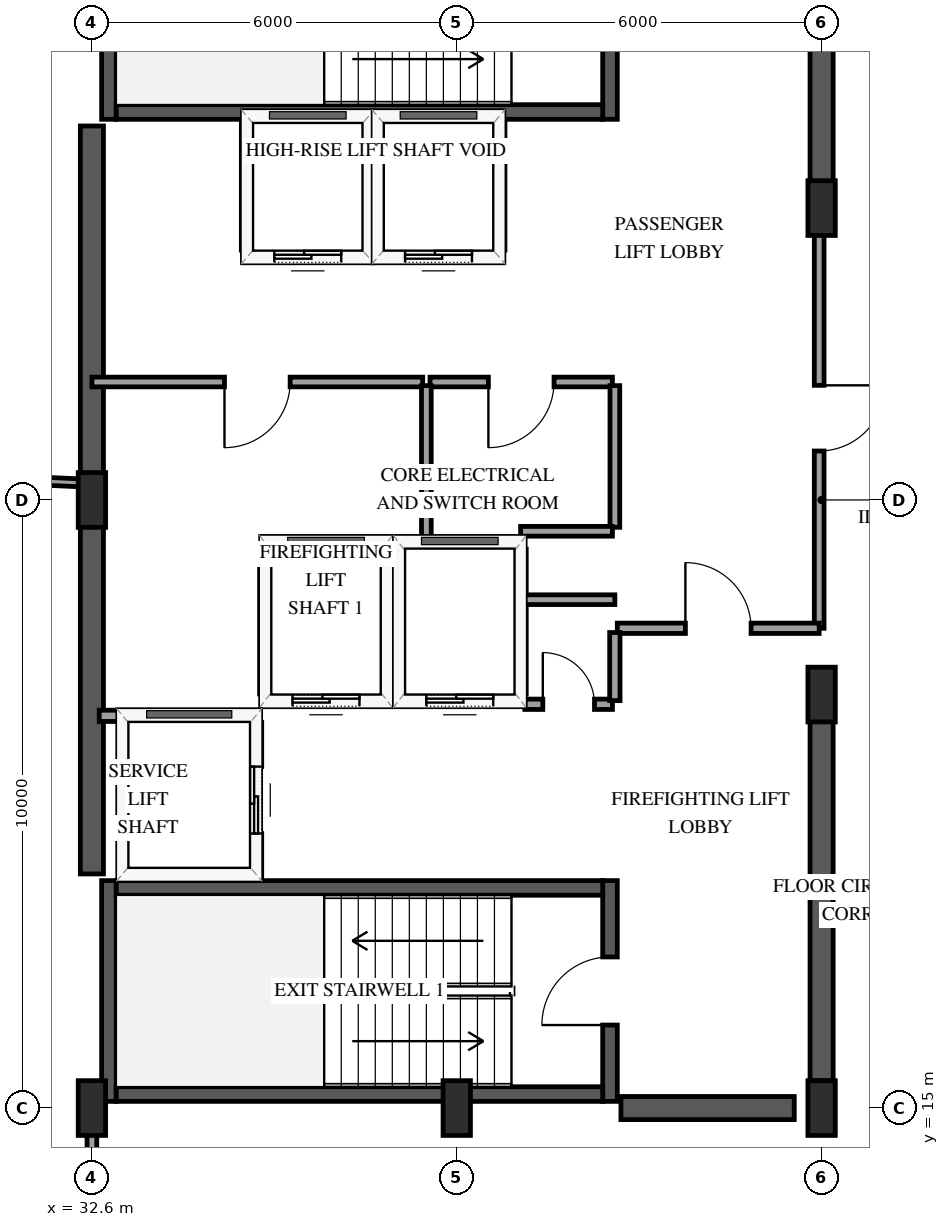
"""IFC4 building model, lengths in metres.
Left out: names, types, materials, properties, quantities, classifications, styles, units other than length and angle.
Written with IfcOpenShell. Run it as: python <this file> out.ifc"""

import sys

from ifc_helpers import new_model, si_unit, direction, frame, frame_2d, origin, origin_2d, place, context, subcontext, project, spatial, rectangle, extrude, element, fill, save


model = new_model("IFC4")
c1 = context("Model", 3, precision=1e-05, world=origin(), true_north=direction((0.0, 1.0)))
c2 = subcontext(c1, "Body", "Model", "MODEL_VIEW")
j1 = project(units=[si_unit("LENGTHUNIT", "METRE"), si_unit("PLANEANGLEUNIT", "RADIAN")], contexts=[c1])
p1 = place(None, origin())
s1 = spatial("IfcSite", under=j1, at=p1, CompositionType="ELEMENT")
p2 = place(p1, origin())
s2 = spatial("IfcBuilding", under=s1, at=p2, CompositionType="ELEMENT")
p3 = place(p2, frame((0.0, 0.0, 301.45)))
s3 = spatial("IfcBuildingStorey", under=s2, at=p3, CompositionType="ELEMENT", Elevation=301.45)
p4 = place(p3, frame((32.88, 15.11, 0.0), z_axis=(0.0, 0.0, 1.0), x_axis=(0.0, 1.0, 0.0)))
e1 = element("IfcWall", 1, at=p4, inside=s3, PredefinedType="SHEAR", context=c2, shape_type="SweptSolid", body=[
    extrude(rectangle(XDim=3.63, YDim=0.24, at=frame_2d((1.815, 0.0))), origin(), (0.0, 0.0, 1.0), 4.2),
])
p5 = place(p3, frame((41.12, 15.11, 0.0), z_axis=(0.0, 0.0, 1.0), x_axis=(0.0, 1.0, 0.0)))
e2 = element("IfcWall", 2, at=p5, inside=s3, PredefinedType="SHEAR", context=c2, shape_type="SweptSolid", body=[
    extrude(rectangle(XDim=3.63, YDim=0.24, at=frame_2d((1.815, 0.0))), origin(), (0.0, 0.0, 1.0), 4.2),
])
p6 = place(p5, frame((1.255, 0.0, 0.0)))
e3 = element("IfcOpeningElement", 3, at=p6, cuts=e2, PredefinedType="OPENING", context=c2, shape_type="SweptSolid", body=[
    extrude(rectangle(XDim=1.12, YDim=2.15, at=frame_2d((0.56, 1.075))), frame((0.0, 0.13, 0.0), z_axis=(0.0, -1.0, 0.0), x_axis=(1.0, 0.0, 0.0)), (0.0, 0.0, 1.0), 0.26),
])
for number, where, z_axis, x_axis in (
    (4, (33.0, 15.23, 0.0), (0.0, 0.0, 1.0), (1.0, 0.0, 0.0)),
    (5, (33.0, 18.62, 0.0), (0.0, 0.0, 1.0), (1.0, 0.0, 0.0)),
):
    element("IfcWall", number, at=place(p3, frame(where, z_axis=z_axis, x_axis=x_axis)), inside=s3, PredefinedType="SHEAR", context=c2, shape_type="SweptSolid", body=[
        extrude(rectangle(XDim=8.0, YDim=0.24, at=frame_2d((4.0, 0.0))), origin(), (0.0, 0.0, 1.0), 4.2),
    ])
p7 = place(p3, frame((32.88, 31.26, 0.0), z_axis=(0.0, 0.0, 1.0), x_axis=(0.0, 1.0, 0.0)))
e6 = element("IfcWall", 6, at=p7, inside=s3, PredefinedType="SHEAR", context=c2, shape_type="SweptSolid", body=[
    extrude(rectangle(XDim=3.63, YDim=0.24, at=frame_2d((1.815, 0.0))), origin(), (0.0, 0.0, 1.0), 4.2),
])
p8 = place(p3, frame((41.12, 31.26, 0.0), z_axis=(0.0, 0.0, 1.0), x_axis=(0.0, 1.0, 0.0)))
e7 = element("IfcWall", 7, at=p8, inside=s3, PredefinedType="SHEAR", context=c2, shape_type="SweptSolid", body=[
    extrude(rectangle(XDim=3.63, YDim=0.24, at=frame_2d((1.815, 0.0))), origin(), (0.0, 0.0, 1.0), 4.2),
])
p9 = place(p8, frame((1.255, 0.0, 0.0)))
e8 = element("IfcOpeningElement", 8, at=p9, cuts=e7, PredefinedType="OPENING", context=c2, shape_type="SweptSolid", body=[
    extrude(rectangle(XDim=1.12, YDim=2.15, at=frame_2d((0.56, 1.075))), frame((0.0, 0.13, 0.0), z_axis=(0.0, -1.0, 0.0), x_axis=(1.0, 0.0, 0.0)), (0.0, 0.0, 1.0), 0.26),
])
p10 = place(p3, frame((33.0, 31.38, 0.0), z_axis=(0.0, 0.0, 1.0), x_axis=(1.0, 0.0, 0.0)))
e9 = element("IfcWall", 9, at=p10, inside=s3, PredefinedType="SHEAR", context=c2, shape_type="SweptSolid", body=[
    extrude(rectangle(XDim=8.0, YDim=0.24, at=frame_2d((4.0, 0.0))), origin(), (0.0, 0.0, 1.0), 4.2),
])
p11 = place(p3, frame((32.6, 18.85, 0.0), z_axis=(0.0, 0.0, 1.0), x_axis=(0.0, 1.0, 0.0)))
e10 = element("IfcWall", 10, at=p11, inside=s3, PredefinedType="SHEAR", context=c2, shape_type="SweptSolid", body=[
    extrude(rectangle(XDim=12.3, YDim=0.38, at=frame_2d((6.15, 0.0))), origin(), (0.0, 0.0, 1.0), 4.2),
])
p12 = place(p3, frame((41.3, 15.0, 0.0), z_axis=(0.0, 0.0, 1.0), x_axis=(1.0, 0.0, 0.0)))
e11 = element("IfcWall", 11, at=p12, inside=s3, PredefinedType="SHEAR", context=c2, shape_type="SweptSolid", body=[
    extrude(rectangle(XDim=2.85, YDim=0.38, at=frame_2d((1.425, 0.0))), origin(), (0.0, 0.0, 1.0), 4.2),
])
p13 = place(p3, frame((44.6, 15.45, 0.0), z_axis=(0.0, 0.0, 1.0), x_axis=(0.0, 1.0, 0.0)))
e12 = element("IfcWall", 12, at=p13, inside=s3, PredefinedType="SHEAR", context=c2, shape_type="SweptSolid", body=[
    extrude(rectangle(XDim=6.35, YDim=0.38, at=frame_2d((3.175, 0.0))), origin(), (0.0, 0.0, 1.0), 4.2),
])
p14 = place(p3, frame((44.6, 29.8, 0.0), z_axis=(0.0, 0.0, 1.0), x_axis=(0.0, 1.0, 0.0)))
e13 = element("IfcWall", 13, at=p14, inside=s3, PredefinedType="SHEAR", context=c2, shape_type="SweptSolid", body=[
    extrude(rectangle(XDim=4.75, YDim=0.38, at=frame_2d((2.375, 0.0))), origin(), (0.0, 0.0, 1.0), 4.2),
])
for number, where, z_axis, x_axis in (
    (14, (32.6, 15.0, 0.0), (0.0, 0.0, 1.0), (1.0, 0.0, 0.0)),
    (15, (32.6, 25.0, 0.0), (0.0, 0.0, 1.0), (1.0, 0.0, 0.0)),
    (16, (38.6, 15.0, 0.0), (0.0, 0.0, 1.0), (1.0, 0.0, 0.0)),
    (17, (44.6, 15.0, 0.0), (0.0, 0.0, 1.0), (1.0, 0.0, 0.0)),
    (18, (44.6, 21.8, 0.0), (0.0, 0.0, 1.0), (1.0, 0.0, 0.0)),
    (19, (44.6, 29.8, 0.0), (0.0, 0.0, 1.0), (1.0, 0.0, 0.0)),
):
    element("IfcColumn", number, at=place(p3, frame(where, z_axis=z_axis, x_axis=x_axis)), inside=s3, PredefinedType="PILASTER", context=c2, shape_type="SweptSolid", body=[
        extrude(rectangle(XDim=0.45, YDim=0.9, at=origin_2d()), origin(), (0.0, 0.0, 1.0), 4.2),
    ])
p15 = place(p3, frame((35.45, 21.7, 0.0), z_axis=(0.0, 0.0, 1.0), x_axis=(1.0, 0.0, 0.0)))
e20 = element("IfcWall", 20, at=p15, inside=s3, PredefinedType="SOLIDWALL", context=c2, shape_type="SweptSolid", body=[
    extrude(rectangle(XDim=2.0, YDim=0.185, at=frame_2d((1.0, 0.0))), origin(), (0.0, 0.0, 1.0), 3.895),
])
p16 = place(p15, frame((0.45, 0.0, 0.0)))
e21 = element("IfcOpeningElement", 21, at=p16, cuts=e20, PredefinedType="OPENING", context=c2, shape_type="SweptSolid", body=[
    extrude(rectangle(XDim=1.1, YDim=2.15, at=frame_2d((0.55, 1.075))), frame((0.0, 0.103, 0.0), z_axis=(0.0, -1.0, 0.0), x_axis=(1.0, 0.0, 0.0)), (0.0, 0.0, 1.0), 0.205),
])
p17 = place(p3, frame((35.45, 24.3, 0.0), z_axis=(0.0, 0.0, 1.0), x_axis=(1.0, 0.0, 0.0)))
e22 = element("IfcWall", 22, at=p17, inside=s3, PredefinedType="SOLIDWALL", context=c2, shape_type="SweptSolid", body=[
    extrude(rectangle(XDim=2.0, YDim=0.185, at=frame_2d((1.0, 0.0))), origin(), (0.0, 0.0, 1.0), 3.895),
])
for number, where, z_axis, x_axis in (
    (23, (35.45, 21.81, 0.0), (0.0, 0.0, 1.0), (0.0, 1.0, 0.0)),
    (24, (37.45, 21.81, 0.0), (0.0, 0.0, 1.0), (0.0, 1.0, 0.0)),
):
    element("IfcWall", number, at=place(p3, frame(where, z_axis=z_axis, x_axis=x_axis)), inside=s3, PredefinedType="SOLIDWALL", context=c2, shape_type="SweptSolid", body=[
        extrude(rectangle(XDim=2.38, YDim=0.185, at=frame_2d((1.19, 0.0))), origin(), (0.0, 0.0, 1.0), 3.895),
    ])
p18 = place(p3, frame((37.65, 21.7, 0.0), z_axis=(0.0, 0.0, 1.0), x_axis=(1.0, 0.0, 0.0)))
e25 = element("IfcWall", 25, at=p18, inside=s3, PredefinedType="SOLIDWALL", context=c2, shape_type="SweptSolid", body=[
    extrude(rectangle(XDim=2.0, YDim=0.185, at=frame_2d((1.0, 0.0))), origin(), (0.0, 0.0, 1.0), 3.895),
])
p19 = place(p18, frame((0.45, 0.0, 0.0)))
e26 = element("IfcOpeningElement", 26, at=p19, cuts=e25, PredefinedType="OPENING", context=c2, shape_type="SweptSolid", body=[
    extrude(rectangle(XDim=1.1, YDim=2.15, at=frame_2d((0.55, 1.075))), frame((0.0, 0.103, 0.0), z_axis=(0.0, -1.0, 0.0), x_axis=(1.0, 0.0, 0.0)), (0.0, 0.0, 1.0), 0.205),
])
p20 = place(p3, frame((37.65, 24.3, 0.0), z_axis=(0.0, 0.0, 1.0), x_axis=(1.0, 0.0, 0.0)))
e27 = element("IfcWall", 27, at=p20, inside=s3, PredefinedType="SOLIDWALL", context=c2, shape_type="SweptSolid", body=[
    extrude(rectangle(XDim=2.0, YDim=0.185, at=frame_2d((1.0, 0.0))), origin(), (0.0, 0.0, 1.0), 3.895),
])
p21 = place(p3, frame((39.65, 21.81, 0.0), z_axis=(0.0, 0.0, 1.0), x_axis=(0.0, 1.0, 0.0)))
e28 = element("IfcWall", 28, at=p21, inside=s3, PredefinedType="SOLIDWALL", context=c2, shape_type="SweptSolid", body=[
    extrude(rectangle(XDim=2.38, YDim=0.185, at=frame_2d((1.19, 0.0))), origin(), (0.0, 0.0, 1.0), 3.895),
])
p22 = place(p3, frame((32.72, 21.45, 0.0), z_axis=(0.0, 0.0, 1.0), x_axis=(1.0, 0.0, 0.0)))
e29 = element("IfcWall", 29, at=p22, inside=s3, PredefinedType="SOLIDWALL", context=c2, shape_type="SweptSolid", body=[
    extrude(rectangle(XDim=2.58, YDim=0.185, at=frame_2d((1.29, 0.0))), origin(), (0.0, 0.0, 1.0), 3.895),
])
p23 = place(p3, frame((35.3, 18.79, 0.0), z_axis=(0.0, 0.0, 1.0), x_axis=(0.0, 1.0, 0.0)))
e30 = element("IfcWall", 30, at=p23, inside=s3, PredefinedType="SOLIDWALL", context=c2, shape_type="SweptSolid", body=[
    extrude(rectangle(XDim=2.55, YDim=0.185, at=frame_2d((1.275, 0.0))), origin(), (0.0, 0.0, 1.0), 3.895),
])
p24 = place(p23, frame((0.725, 0.0, 0.0)))
e31 = element("IfcOpeningElement", 31, at=p24, cuts=e30, PredefinedType="OPENING", context=c2, shape_type="SweptSolid", body=[
    extrude(rectangle(XDim=1.1, YDim=2.15, at=frame_2d((0.55, 1.075))), frame((0.0, 0.103, 0.0), z_axis=(0.0, -1.0, 0.0), x_axis=(1.0, 0.0, 0.0)), (0.0, 0.0, 1.0), 0.205),
])
p25 = place(p3, frame((35.15, 29.0, 0.0), z_axis=(0.0, 0.0, 1.0), x_axis=(1.0, 0.0, 0.0)))
e32 = element("IfcWall", 32, at=p25, inside=s3, PredefinedType="SOLIDWALL", context=c2, shape_type="SweptSolid", body=[
    extrude(rectangle(XDim=2.0, YDim=0.185, at=frame_2d((1.0, 0.0))), origin(), (0.0, 0.0, 1.0), 3.895),
])
p26 = place(p25, frame((0.45, 0.0, 0.0)))
e33 = element("IfcOpeningElement", 33, at=p26, cuts=e32, PredefinedType="OPENING", context=c2, shape_type="SweptSolid", body=[
    extrude(rectangle(XDim=1.1, YDim=2.15, at=frame_2d((0.55, 1.075))), frame((0.0, 0.103, 0.0), z_axis=(0.0, -1.0, 0.0), x_axis=(1.0, 0.0, 0.0)), (0.0, 0.0, 1.0), 0.205),
])
for number, where, z_axis, x_axis in (
    (34, (35.15, 29.11, 0.0), (0.0, 0.0, 1.0), (0.0, 1.0, 0.0)),
    (35, (37.15, 29.11, 0.0), (0.0, 0.0, 1.0), (0.0, 1.0, 0.0)),
):
    element("IfcWall", number, at=place(p3, frame(where, z_axis=z_axis, x_axis=x_axis)), inside=s3, PredefinedType="SOLIDWALL", context=c2, shape_type="SweptSolid", body=[
        extrude(rectangle(XDim=2.1, YDim=0.185, at=frame_2d((1.05, 0.0))), origin(), (0.0, 0.0, 1.0), 3.895),
    ])
p27 = place(p3, frame((37.3, 29.0, 0.0), z_axis=(0.0, 0.0, 1.0), x_axis=(1.0, 0.0, 0.0)))
e36 = element("IfcWall", 36, at=p27, inside=s3, PredefinedType="SOLIDWALL", context=c2, shape_type="SweptSolid", body=[
    extrude(rectangle(XDim=2.0, YDim=0.185, at=frame_2d((1.0, 0.0))), origin(), (0.0, 0.0, 1.0), 3.895),
])
p28 = place(p27, frame((0.45, 0.0, 0.0)))
e37 = element("IfcOpeningElement", 37, at=p28, cuts=e36, PredefinedType="OPENING", context=c2, shape_type="SweptSolid", body=[
    extrude(rectangle(XDim=1.1, YDim=2.15, at=frame_2d((0.55, 1.075))), frame((0.0, 0.103, 0.0), z_axis=(0.0, -1.0, 0.0), x_axis=(1.0, 0.0, 0.0)), (0.0, 0.0, 1.0), 0.205),
])
p29 = place(p3, frame((39.3, 29.11, 0.0), z_axis=(0.0, 0.0, 1.0), x_axis=(0.0, 1.0, 0.0)))
e38 = element("IfcWall", 38, at=p29, inside=s3, PredefinedType="SOLIDWALL", context=c2, shape_type="SweptSolid", body=[
    extrude(rectangle(XDim=2.1, YDim=0.185, at=frame_2d((1.05, 0.0))), origin(), (0.0, 0.0, 1.0), 3.895),
])
p30 = place(p3, frame((44.56, 29.8, 0.0), z_axis=(0.0, 0.0, 1.0), x_axis=(0.0, -1.0, 0.0)))
e39 = element("IfcWall", 39, at=p30, inside=s3, PredefinedType="PARTITIONING", context=c2, shape_type="SweptSolid", body=[
    extrude(rectangle(XDim=6.91, YDim=0.16, at=frame_2d((3.455, 0.0))), origin(), (0.0, 0.0, 1.0), 2.935),
])
p31 = place(p30, frame((2.915, 0.0, 0.0)))
e40 = element("IfcOpeningElement", 40, at=p31, cuts=e39, PredefinedType="OPENING", context=c2, shape_type="SweptSolid", body=[
    extrude(rectangle(XDim=1.08, YDim=2.15, at=frame_2d((0.54, 1.075))), frame((0.0, 0.09, 0.0), z_axis=(0.0, -1.0, 0.0), x_axis=(1.0, 0.0, 0.0)), (0.0, 0.0, 1.0), 0.18),
])
p32 = place(p3, frame((32.527, 25.276, 0.0), z_axis=(0.0, 0.0, 1.0), x_axis=(-0.99896311896, 0.045526771868, 0.0)))
e41 = element("IfcWall", 41, at=p32, inside=s3, PredefinedType="PARTITIONING", context=c2, shape_type="SweptSolid", body=[
    extrude(rectangle(XDim=6.88, YDim=0.13, at=frame_2d((3.44, 0.0))), origin(), (0.0, 0.0, 1.0), 3.19),
])
p33 = place(p3, frame((38.04, 26.94, 0.0), z_axis=(0.0, 0.0, 1.0), x_axis=(-1.0, 0.0, 0.0)))
e42 = element("IfcWall", 42, at=p33, inside=s3, PredefinedType="PARTITIONING", context=c2, shape_type="SweptSolid", body=[
    extrude(rectangle(XDim=5.44, YDim=0.16, at=frame_2d((2.72, 0.0))), origin(), (0.0, 0.0, 1.0), 3.895),
])
p34 = place(p33, frame((2.18, 0.0, 0.0)))
e43 = element("IfcOpeningElement", 43, at=p34, cuts=e42, PredefinedType="OPENING", context=c2, shape_type="SweptSolid", body=[
    extrude(rectangle(XDim=1.08, YDim=2.15, at=frame_2d((0.54, 1.075))), frame((0.0, 0.09, 0.0), z_axis=(0.0, -1.0, 0.0), x_axis=(1.0, 0.0, 0.0)), (0.0, 0.0, 1.0), 0.18),
])
p35 = place(p3, frame((41.24, 22.89, 0.0), z_axis=(0.0, 0.0, 1.0), x_axis=(1.0, 0.0, 0.0)))
e44 = element("IfcWall", 44, at=p35, inside=s3, PredefinedType="PARTITIONING", context=c2, shape_type="SweptSolid", body=[
    extrude(rectangle(XDim=3.32, YDim=0.17, at=frame_2d((1.66, 0.0))), origin(), (0.0, 0.0, 1.0), 3.895),
])
p36 = place(p35, frame((1.12, 0.0, 0.0)))
e45 = element("IfcOpeningElement", 45, at=p36, cuts=e44, PredefinedType="OPENING", context=c2, shape_type="SweptSolid", body=[
    extrude(rectangle(XDim=1.08, YDim=2.15, at=frame_2d((0.54, 1.075))), frame((0.0, 0.095, 0.0), z_axis=(0.0, -1.0, 0.0), x_axis=(1.0, 0.0, 0.0)), (0.0, 0.0, 1.0), 0.19),
])
p37 = place(p3, frame((41.16, 26.94, 0.0), z_axis=(0.0, 0.0, 1.0), x_axis=(-1.0, 0.0, 0.0)))
e46 = element("IfcWall", 46, at=p37, inside=s3, PredefinedType="PARTITIONING", context=c2, shape_type="SweptSolid", body=[
    extrude(rectangle(XDim=3.0, YDim=0.16, at=frame_2d((1.5, 0.0))), origin(), (0.0, 0.0, 1.0), 3.895),
])
p38 = place(p37, frame((0.96, 0.0, 0.0)))
e47 = element("IfcOpeningElement", 47, at=p38, cuts=e46, PredefinedType="OPENING", context=c2, shape_type="SweptSolid", body=[
    extrude(rectangle(XDim=1.08, YDim=2.15, at=frame_2d((0.54, 1.075))), frame((0.0, 0.09, 0.0), z_axis=(0.0, -1.0, 0.0), x_axis=(1.0, 0.0, 0.0)), (0.0, 0.0, 1.0), 0.18),
])
p39 = place(p3, frame((32.6, 12.242, 0.0), z_axis=(0.0, 0.0, 1.0), x_axis=(0.0, 1.0, 0.0)))
e48 = element("IfcWall", 48, at=p39, inside=s3, PredefinedType="PARTITIONING", context=c2, shape_type="SweptSolid", body=[
    extrude(rectangle(XDim=2.638, YDim=0.16, at=frame_2d((1.319, 0.0))), origin(), (0.0, 0.0, 1.0), 3.895),
])
p40 = place(p3, frame((38.1, 26.88, 0.0), z_axis=(0.0, 0.0, 1.0), x_axis=(0.0, -1.0, 0.0)))
e49 = element("IfcWall", 49, at=p40, inside=s3, PredefinedType="PARTITIONING", context=c2, shape_type="SweptSolid", body=[
    extrude(rectangle(XDim=2.58, YDim=0.16, at=frame_2d((1.29, 0.0))), origin(), (0.0, 0.0, 1.0), 3.895),
])
p41 = place(p3, frame((41.2, 24.55, 0.0), z_axis=(0.0, 0.0, 1.0), x_axis=(0.0, 1.0, 0.0)))
e50 = element("IfcWall", 50, at=p41, inside=s3, PredefinedType="PARTITIONING", context=c2, shape_type="SweptSolid", body=[
    extrude(rectangle(XDim=2.33, YDim=0.16, at=frame_2d((1.165, 0.0))), origin(), (0.0, 0.0, 1.0), 3.895),
])
p42 = place(p3, frame((39.65, 24.485, 0.0), z_axis=(0.0, 0.0, 1.0), x_axis=(1.0, 0.0, 0.0)))
e51 = element("IfcWall", 51, at=p42, inside=s3, PredefinedType="PARTITIONING", context=c2, shape_type="SweptSolid", body=[
    extrude(rectangle(XDim=1.51, YDim=0.16, at=frame_2d((0.755, 0.0))), origin(), (0.0, 0.0, 1.0), 3.895),
])
p43 = place(p3, frame((39.72, 21.64, 0.0), z_axis=(0.0, 0.0, 1.0), x_axis=(1.0, 0.0, 0.0)))
e52 = element("IfcWall", 52, at=p43, inside=s3, PredefinedType="PARTITIONING", context=c2, shape_type="SweptSolid", body=[
    extrude(rectangle(XDim=1.44, YDim=0.17, at=frame_2d((0.72, 0.0))), origin(), (0.0, 0.0, 1.0), 3.895),
])
p44 = place(p43, frame((0.295, 0.0, 0.0)))
e53 = element("IfcOpeningElement", 53, at=p44, cuts=e52, PredefinedType="OPENING", context=c2, shape_type="SweptSolid", body=[
    extrude(rectangle(XDim=0.85, YDim=2.1, at=frame_2d((0.425, 1.05))), frame((0.0, 0.095, 0.0), z_axis=(0.0, -1.0, 0.0), x_axis=(1.0, 0.0, 0.0)), (0.0, 0.0, 1.0), 0.19),
])
p45 = place(p3, frame((41.2, 21.7, 0.0), z_axis=(0.0, 0.0, 1.0), x_axis=(0.0, 1.0, 0.0)))
e54 = element("IfcWall", 54, at=p45, inside=s3, PredefinedType="PARTITIONING", context=c2, shape_type="SweptSolid", body=[
    extrude(rectangle(XDim=1.12, YDim=0.17, at=frame_2d((0.56, 0.0))), origin(), (0.0, 0.0, 1.0), 3.895),
])
p46 = place(p3, frame((41.2, 23.36, 0.0), z_axis=(0.0, 0.0, 1.0), x_axis=(-1.0, 0.0, 0.0)))
e55 = element("IfcWall", 55, at=p46, inside=s3, PredefinedType="PARTITIONING", context=c2, shape_type="SweptSolid", body=[
    extrude(rectangle(XDim=1.48, YDim=0.16, at=frame_2d((0.74, 0.0))), origin(), (0.0, 0.0, 1.0), 3.895),
])
p47 = place(p16, origin())
e56 = element("IfcDoor", 56, at=p47, inside=s3, OperationType="SLIDING_TO_LEFT", PredefinedType="DOOR", context=c2, shape_type="SweptSolid", body=[
    extrude(rectangle(XDim=1.1, YDim=2.15, at=frame_2d((0.55, 1.075))), frame((0.0, 0.025, 0.0), z_axis=(0.0, -1.0, 0.0), x_axis=(1.0, 0.0, 0.0)), (0.0, 0.0, 1.0), 0.05),
])
fill(e21, e56)
p48 = place(p19, origin())
e57 = element("IfcDoor", 57, at=p48, inside=s3, OperationType="SLIDING_TO_LEFT", PredefinedType="DOOR", context=c2, shape_type="SweptSolid", body=[
    extrude(rectangle(XDim=1.1, YDim=2.15, at=frame_2d((0.55, 1.075))), frame((0.0, 0.025, 0.0), z_axis=(0.0, -1.0, 0.0), x_axis=(1.0, 0.0, 0.0)), (0.0, 0.0, 1.0), 0.05),
])
fill(e26, e57)
p49 = place(p24, origin())
e58 = element("IfcDoor", 58, at=p49, inside=s3, OperationType="SLIDING_TO_LEFT", PredefinedType="DOOR", context=c2, shape_type="SweptSolid", body=[
    extrude(rectangle(XDim=1.1, YDim=2.15, at=frame_2d((0.55, 1.075))), frame((0.0, 0.025, 0.0), z_axis=(0.0, -1.0, 0.0), x_axis=(1.0, 0.0, 0.0)), (0.0, 0.0, 1.0), 0.05),
])
fill(e31, e58)
p50 = place(p26, origin())
e59 = element("IfcDoor", 59, at=p50, inside=s3, OperationType="SLIDING_TO_LEFT", PredefinedType="DOOR", context=c2, shape_type="SweptSolid", body=[
    extrude(rectangle(XDim=1.1, YDim=2.15, at=frame_2d((0.55, 1.075))), frame((0.0, 0.025, 0.0), z_axis=(0.0, -1.0, 0.0), x_axis=(1.0, 0.0, 0.0)), (0.0, 0.0, 1.0), 0.05),
])
fill(e33, e59)
p51 = place(p28, origin())
e60 = element("IfcDoor", 60, at=p51, inside=s3, OperationType="SLIDING_TO_LEFT", PredefinedType="DOOR", context=c2, shape_type="SweptSolid", body=[
    extrude(rectangle(XDim=1.1, YDim=2.15, at=frame_2d((0.55, 1.075))), frame((0.0, 0.025, 0.0), z_axis=(0.0, -1.0, 0.0), x_axis=(1.0, 0.0, 0.0)), (0.0, 0.0, 1.0), 0.05),
])
fill(e37, e60)
p52 = place(p6, origin())
e61 = element("IfcDoor", 61, at=p52, inside=s3, OperationType="SINGLE_SWING_LEFT", PredefinedType="DOOR", context=c2, shape_type="SweptSolid", body=[
    extrude(rectangle(XDim=1.12, YDim=2.15, at=frame_2d((0.56, 1.075))), frame((0.0, 0.025, 0.0), z_axis=(0.0, -1.0, 0.0), x_axis=(1.0, 0.0, 0.0)), (0.0, 0.0, 1.0), 0.05),
])
fill(e3, e61)
p53 = place(p31, origin())
e62 = element("IfcDoor", 62, at=p53, inside=s3, OperationType="SINGLE_SWING_LEFT", PredefinedType="DOOR", context=c2, shape_type="SweptSolid", body=[
    extrude(rectangle(XDim=1.08, YDim=2.15, at=frame_2d((0.54, 1.075))), frame((0.0, 0.025, 0.0), z_axis=(0.0, -1.0, 0.0), x_axis=(1.0, 0.0, 0.0)), (0.0, 0.0, 1.0), 0.05),
])
fill(e40, e62)
p54 = place(p34, origin())
e63 = element("IfcDoor", 63, at=p54, inside=s3, OperationType="SINGLE_SWING_RIGHT", PredefinedType="DOOR", context=c2, shape_type="SweptSolid", body=[
    extrude(rectangle(XDim=1.08, YDim=2.15, at=frame_2d((0.54, 1.075))), frame((0.0, 0.025, 0.0), z_axis=(0.0, -1.0, 0.0), x_axis=(1.0, 0.0, 0.0)), (0.0, 0.0, 1.0), 0.05),
])
fill(e43, e63)
p55 = place(p36, origin())
e64 = element("IfcDoor", 64, at=p55, inside=s3, OperationType="SINGLE_SWING_LEFT", PredefinedType="DOOR", context=c2, shape_type="SweptSolid", body=[
    extrude(rectangle(XDim=1.08, YDim=2.15, at=frame_2d((0.54, 1.075))), frame((0.0, 0.025, 0.0), z_axis=(0.0, -1.0, 0.0), x_axis=(1.0, 0.0, 0.0)), (0.0, 0.0, 1.0), 0.05),
])
fill(e45, e64)
p56 = place(p38, origin())
e65 = element("IfcDoor", 65, at=p56, inside=s3, OperationType="SINGLE_SWING_RIGHT", PredefinedType="DOOR", context=c2, shape_type="SweptSolid", body=[
    extrude(rectangle(XDim=1.08, YDim=2.15, at=frame_2d((0.54, 1.075))), frame((0.0, 0.025, 0.0), z_axis=(0.0, -1.0, 0.0), x_axis=(1.0, 0.0, 0.0)), (0.0, 0.0, 1.0), 0.05),
])
fill(e47, e65)
p57 = place(p44, origin())
e66 = element("IfcDoor", 66, at=p57, inside=s3, OperationType="SINGLE_SWING_LEFT", PredefinedType="DOOR", context=c2, shape_type="SweptSolid", body=[
    extrude(rectangle(XDim=0.85, YDim=2.1, at=frame_2d((0.425, 1.05))), frame((0.0, 0.025, 0.0), z_axis=(0.0, -1.0, 0.0), x_axis=(1.0, 0.0, 0.0)), (0.0, 0.0, 1.0), 0.05),
])
fill(e53, e66)
save(model, sys.argv[1])
